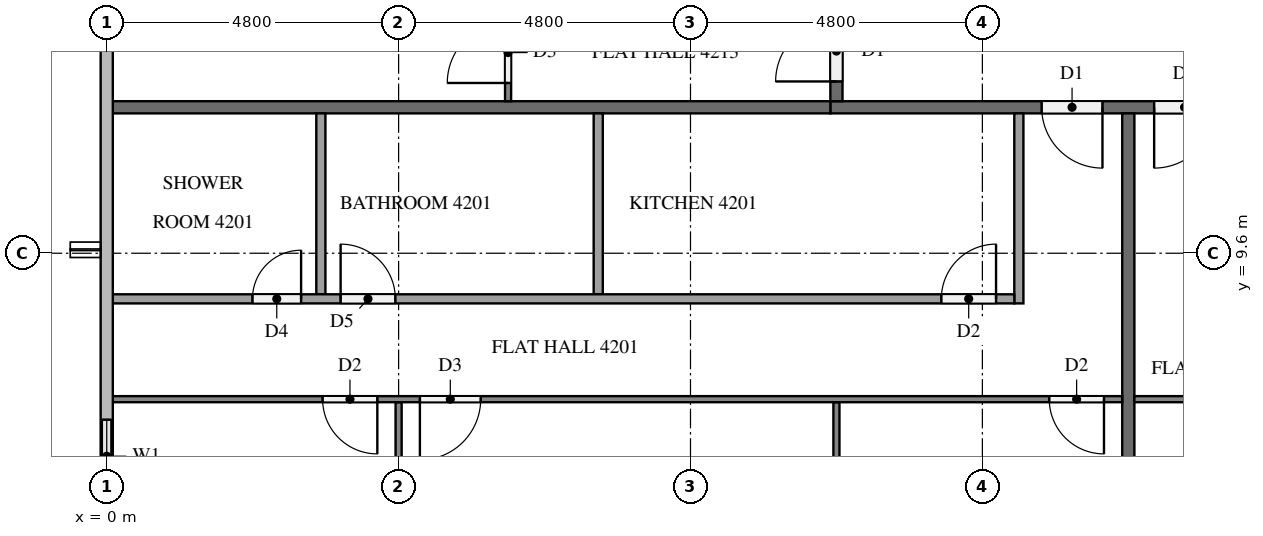
"""IFC4 building model, lengths in metres.
Left out: names, types, materials, properties, quantities, classifications, styles, units other than length and angle.
Written with IfcOpenShell. Run it as: python <this file> out.ifc"""

import sys

from ifc_helpers import new_model, si_unit, direction, frame, frame_2d, origin, place, context, subcontext, project, spatial, rectangle, extrude, element, fill, save


model = new_model("IFC4")
c1 = context("Model", 3, precision=1e-05, world=origin(), true_north=direction((0.0, 1.0)))
c2 = subcontext(c1, "Body", "Model", "MODEL_VIEW")
j1 = project(units=[si_unit("LENGTHUNIT", "METRE"), si_unit("PLANEANGLEUNIT", "RADIAN")], contexts=[c1])
p1 = place(None, origin())
s1 = spatial("IfcSite", under=j1, at=p1, CompositionType="ELEMENT")
p2 = place(p1, origin())
s2 = spatial("IfcBuilding", under=s1, at=p2, CompositionType="ELEMENT")
p3 = place(p2, frame((0.0, 0.0, 163.0)))
s3 = spatial("IfcBuildingStorey", under=s2, at=p3, CompositionType="ELEMENT", Elevation=163.0)
p4 = place(p3, frame((0.0, 7.2, 0.0), z_axis=(0.0, 0.0, 1.0), x_axis=(0.0, -1.0, 0.0)))
e1 = element("IfcWall", 1, at=p4, inside=s3, PredefinedType="SOLIDWALL", context=c2, shape_type="SweptSolid", body=[
    extrude(rectangle(XDim=1.875, YDim=0.15, at=frame_2d((0.938, 0.0))), origin(), (0.0, 0.0, 1.0), 3.2),
])
p5 = place(p4, frame((0.337, 0.0, 0.9)))
e2 = element("IfcOpeningElement", 2, at=p5, cuts=e1, PredefinedType="OPENING", context=c2, shape_type="SweptSolid", body=[
    extrude(rectangle(XDim=1.2, YDim=1.4, at=frame_2d((0.6, 0.7))), frame((0.0, 0.085, 0.0), z_axis=(0.0, -1.0, 0.0), x_axis=(1.0, 0.0, 0.0)), (0.0, 0.0, 1.0), 0.17),
])
p6 = place(p3, frame((50.5, 12.0, 0.0), z_axis=(0.0, 0.0, 1.0), x_axis=(-1.0, 0.0, 0.0)))
e3 = element("IfcWall", 3, at=p6, inside=s3, PredefinedType="PARTITIONING", context=c2, shape_type="SweptSolid", body=[
    extrude(rectangle(XDim=38.6, YDim=0.2, at=frame_2d((19.3, 0.0))), origin(), (0.0, 0.0, 1.0), 3.2),
])
p7 = place(p6, frame((34.125, 0.0, 0.0)))
e4 = element("IfcOpeningElement", 4, at=p7, cuts=e3, PredefinedType="OPENING", context=c2, shape_type="SweptSolid", body=[
    extrude(rectangle(XDim=1.0, YDim=2.1, at=frame_2d((0.5, 1.05))), frame((0.0, 0.11, 0.0), z_axis=(0.0, -1.0, 0.0), x_axis=(1.0, 0.0, 0.0)), (0.0, 0.0, 1.0), 0.22),
])
p8 = place(p6, frame((32.275, 0.0, 0.0)))
e5 = element("IfcOpeningElement", 5, at=p8, cuts=e3, PredefinedType="OPENING", context=c2, shape_type="SweptSolid", body=[
    extrude(rectangle(XDim=1.0, YDim=2.1, at=frame_2d((0.5, 1.05))), frame((0.0, 0.11, 0.0), z_axis=(0.0, -1.0, 0.0), x_axis=(1.0, 0.0, 0.0)), (0.0, 0.0, 1.0), 0.22),
])
p9 = place(p6, frame((12.525, 0.0, 0.0)))
e6 = element("IfcOpeningElement", 6, at=p9, cuts=e3, PredefinedType="OPENING", context=c2, shape_type="SweptSolid", body=[
    extrude(rectangle(XDim=1.0, YDim=2.1, at=frame_2d((0.5, 1.05))), frame((0.0, 0.11, 0.0), z_axis=(0.0, -1.0, 0.0), x_axis=(1.0, 0.0, 0.0)), (0.0, 0.0, 1.0), 0.22),
])
p10 = place(p6, frame((10.625, 0.0, 0.0)))
e7 = element("IfcOpeningElement", 7, at=p10, cuts=e3, PredefinedType="OPENING", context=c2, shape_type="SweptSolid", body=[
    extrude(rectangle(XDim=1.1, YDim=2.1, at=frame_2d((0.55, 1.05))), frame((0.0, 0.11, 0.0), z_axis=(0.0, -1.0, 0.0), x_axis=(1.0, 0.0, 0.0)), (0.0, 0.0, 1.0), 0.22),
])
p11 = place(p3, frame((12.0, 12.1, 0.0), z_axis=(0.0, 0.0, 1.0), x_axis=(0.0, 1.0, 0.0)))
e8 = element("IfcWall", 8, at=p11, inside=s3, PredefinedType="PARTITIONING", context=c2, shape_type="SweptSolid", body=[
    extrude(rectangle(XDim=28.6, YDim=0.2, at=frame_2d((14.3, 0.0))), origin(), (0.0, 0.0, 1.0), 3.2),
])
p12 = place(p11, frame((24.325, 0.0, 0.0)))
e9 = element("IfcOpeningElement", 9, at=p12, cuts=e8, PredefinedType="OPENING", context=c2, shape_type="SweptSolid", body=[
    extrude(rectangle(XDim=1.0, YDim=2.1, at=frame_2d((0.5, 1.05))), frame((0.0, 0.11, 0.0), z_axis=(0.0, -1.0, 0.0), x_axis=(1.0, 0.0, 0.0)), (0.0, 0.0, 1.0), 0.22),
])
p13 = place(p11, frame((22.475, 0.0, 0.0)))
e10 = element("IfcOpeningElement", 10, at=p13, cuts=e8, PredefinedType="OPENING", context=c2, shape_type="SweptSolid", body=[
    extrude(rectangle(XDim=1.0, YDim=2.1, at=frame_2d((0.5, 1.05))), frame((0.0, 0.11, 0.0), z_axis=(0.0, -1.0, 0.0), x_axis=(1.0, 0.0, 0.0)), (0.0, 0.0, 1.0), 0.22),
])
p14 = place(p11, frame((0.325, 0.0, 0.0)))
e11 = element("IfcOpeningElement", 11, at=p14, cuts=e8, PredefinedType="OPENING", context=c2, shape_type="SweptSolid", body=[
    extrude(rectangle(XDim=1.0, YDim=2.1, at=frame_2d((0.5, 1.05))), frame((0.0, 0.11, 0.0), z_axis=(0.0, -1.0, 0.0), x_axis=(1.0, 0.0, 0.0)), (0.0, 0.0, 1.0), 0.22),
])
for number, where, z_axis, x_axis in (
    (12, (16.8, 11.9, 0.0), (0.0, 0.0, 1.0), (0.0, -1.0, 0.0)),
    (13, (0.1, 12.0, 0.0), (0.0, 0.0, 1.0), (1.0, 0.0, 0.0)),
):
    element("IfcWall", number, at=place(p3, frame(where, z_axis=z_axis, x_axis=x_axis)), inside=s3, PredefinedType="PARTITIONING", context=c2, shape_type="SweptSolid", body=[
        extrude(rectangle(XDim=11.8, YDim=0.2, at=frame_2d((5.9, 0.0))), origin(), (0.0, 0.0, 1.0), 3.2),
    ])
p15 = place(p3, frame((12.0, 7.15, 0.0), z_axis=(0.0, 0.0, 1.0), x_axis=(0.0, -1.0, 0.0)))
e14 = element("IfcWall", 14, at=p15, inside=s3, PredefinedType="PARTITIONING", context=c2, shape_type="SweptSolid", body=[
    extrude(rectangle(XDim=7.05, YDim=0.1, at=frame_2d((3.525, 0.0))), origin(), (0.0, 0.0, 1.0), 3.2),
])
p16 = place(p3, frame((4.8, 7.15, 0.0), z_axis=(0.0, 0.0, 1.0), x_axis=(0.0, -1.0, 0.0)))
e15 = element("IfcWall", 15, at=p16, inside=s3, PredefinedType="PARTITIONING", context=c2, shape_type="SweptSolid", body=[
    extrude(rectangle(XDim=6.625, YDim=0.1, at=frame_2d((3.312, 0.0))), origin(), (0.0, 0.0, 1.0), 3.2),
])
p17 = place(p3, frame((16.7, 7.2, 0.0), z_axis=(0.0, 0.0, 1.0), x_axis=(-1.0, 0.0, 0.0)))
e16 = element("IfcWall", 16, at=p17, inside=s3, PredefinedType="PARTITIONING", context=c2, shape_type="SweptSolid", body=[
    extrude(rectangle(XDim=16.6, YDim=0.1, at=frame_2d((8.3, 0.0))), origin(), (0.0, 0.0, 1.0), 3.2),
])
p18 = place(p17, frame((0.3, 0.0, 0.0)))
e17 = element("IfcOpeningElement", 17, at=p18, cuts=e16, PredefinedType="OPENING", context=c2, shape_type="SweptSolid", body=[
    extrude(rectangle(XDim=0.9, YDim=2.1, at=frame_2d((0.45, 1.05))), frame((0.0, 0.06, 0.0), z_axis=(0.0, -1.0, 0.0), x_axis=(1.0, 0.0, 0.0)), (0.0, 0.0, 1.0), 0.12),
])
p19 = place(p17, frame((10.55, 0.0, 0.0)))
e18 = element("IfcOpeningElement", 18, at=p19, cuts=e16, PredefinedType="OPENING", context=c2, shape_type="SweptSolid", body=[
    extrude(rectangle(XDim=1.0, YDim=2.1, at=frame_2d((0.5, 1.05))), frame((0.0, 0.06, 0.0), z_axis=(0.0, -1.0, 0.0), x_axis=(1.0, 0.0, 0.0)), (0.0, 0.0, 1.0), 0.12),
])
p20 = place(p17, frame((12.25, 0.0, 0.0)))
e19 = element("IfcOpeningElement", 19, at=p20, cuts=e16, PredefinedType="OPENING", context=c2, shape_type="SweptSolid", body=[
    extrude(rectangle(XDim=0.9, YDim=2.1, at=frame_2d((0.45, 1.05))), frame((0.0, 0.06, 0.0), z_axis=(0.0, -1.0, 0.0), x_axis=(1.0, 0.0, 0.0)), (0.0, 0.0, 1.0), 0.12),
])
for number, where, z_axis, x_axis in (
    (20, (8.083, 11.9, 0.0), (0.0, 0.0, 1.0), (0.0, -1.0, 0.0)),
    (21, (3.521, 11.9, 0.0), (0.0, 0.0, 1.0), (0.0, -1.0, 0.0)),
):
    element("IfcWall", number, at=place(p3, frame(where, z_axis=z_axis, x_axis=x_axis)), inside=s3, PredefinedType="PARTITIONING", context=c2, shape_type="SweptSolid", body=[
        extrude(rectangle(XDim=2.975, YDim=0.15, at=frame_2d((1.487, 0.0))), origin(), (0.0, 0.0, 1.0), 3.2),
    ])
p21 = place(p3, frame((15.0, 11.9, 0.0), z_axis=(0.0, 0.0, 1.0), x_axis=(0.0, -1.0, 0.0)))
e22 = element("IfcWall", 22, at=p21, inside=s3, PredefinedType="PARTITIONING", context=c2, shape_type="SweptSolid", body=[
    extrude(rectangle(XDim=3.125, YDim=0.15, at=frame_2d((1.562, 0.0))), origin(), (0.0, 0.0, 1.0), 3.2),
])
p22 = place(p3, frame((0.1, 8.85, 0.0), z_axis=(0.0, 0.0, 1.0), x_axis=(1.0, 0.0, 0.0)))
e23 = element("IfcWall", 23, at=p22, inside=s3, PredefinedType="PARTITIONING", context=c2, shape_type="SweptSolid", body=[
    extrude(rectangle(XDim=14.825, YDim=0.15, at=frame_2d((7.413, 0.0))), origin(), (0.0, 0.0, 1.0), 3.2),
])
p23 = place(p22, frame((13.625, 0.0, 0.0)))
e24 = element("IfcOpeningElement", 24, at=p23, cuts=e23, PredefinedType="OPENING", context=c2, shape_type="SweptSolid", body=[
    extrude(rectangle(XDim=0.9, YDim=2.1, at=frame_2d((0.45, 1.05))), frame((0.0, 0.085, 0.0), z_axis=(0.0, -1.0, 0.0), x_axis=(1.0, 0.0, 0.0)), (0.0, 0.0, 1.0), 0.17),
])
p24 = place(p22, frame((3.746, 0.0, 0.0)))
e25 = element("IfcOpeningElement", 25, at=p24, cuts=e23, PredefinedType="OPENING", context=c2, shape_type="SweptSolid", body=[
    extrude(rectangle(XDim=0.9, YDim=2.1, at=frame_2d((0.45, 1.05))), frame((0.0, 0.085, 0.0), z_axis=(0.0, -1.0, 0.0), x_axis=(1.0, 0.0, 0.0)), (0.0, 0.0, 1.0), 0.17),
])
p25 = place(p22, frame((2.296, 0.0, 0.0)))
e26 = element("IfcOpeningElement", 26, at=p25, cuts=e23, PredefinedType="OPENING", context=c2, shape_type="SweptSolid", body=[
    extrude(rectangle(XDim=0.8, YDim=2.1, at=frame_2d((0.4, 1.05))), frame((0.0, 0.085, 0.0), z_axis=(0.0, -1.0, 0.0), x_axis=(1.0, 0.0, 0.0)), (0.0, 0.0, 1.0), 0.17),
])
p26 = place(p3, frame((23.9, 7.2, 0.0), z_axis=(0.0, 0.0, 1.0), x_axis=(-1.0, 0.0, 0.0)))
e27 = element("IfcWall", 27, at=p26, inside=s3, PredefinedType="PARTITIONING", context=c2, shape_type="SweptSolid", body=[
    extrude(rectangle(XDim=7.0, YDim=0.1, at=frame_2d((3.5, 0.0))), origin(), (0.0, 0.0, 1.0), 3.2),
])
p27 = place(p26, frame((0.3, 0.0, 0.0)))
e28 = element("IfcOpeningElement", 28, at=p27, cuts=e27, PredefinedType="OPENING", context=c2, shape_type="SweptSolid", body=[
    extrude(rectangle(XDim=1.0, YDim=2.1, at=frame_2d((0.5, 1.05))), frame((0.0, 0.06, 0.0), z_axis=(0.0, -1.0, 0.0), x_axis=(1.0, 0.0, 0.0)), (0.0, 0.0, 1.0), 0.12),
])
p28 = place(p3, frame((6.6, 12.1, 0.0), z_axis=(0.0, 0.0, 1.0), x_axis=(0.0, 1.0, 0.0)))
e29 = element("IfcWall", 29, at=p28, inside=s3, PredefinedType="PARTITIONING", context=c2, shape_type="SweptSolid", body=[
    extrude(rectangle(XDim=14.2, YDim=0.1, at=frame_2d((7.1, 0.0))), origin(), (0.0, 0.0, 1.0), 3.2),
])
p29 = place(p28, frame((0.3, 0.0, 0.0)))
e30 = element("IfcOpeningElement", 30, at=p29, cuts=e29, PredefinedType="OPENING", context=c2, shape_type="SweptSolid", body=[
    extrude(rectangle(XDim=1.0, YDim=2.1, at=frame_2d((0.5, 1.05))), frame((0.0, 0.06, 0.0), z_axis=(0.0, -1.0, 0.0), x_axis=(1.0, 0.0, 0.0)), (0.0, 0.0, 1.0), 0.12),
])
p30 = place(p28, frame((8.25, 0.0, 0.0)))
e31 = element("IfcOpeningElement", 31, at=p30, cuts=e29, PredefinedType="OPENING", context=c2, shape_type="SweptSolid", body=[
    extrude(rectangle(XDim=0.9, YDim=2.1, at=frame_2d((0.45, 1.05))), frame((0.0, 0.06, 0.0), z_axis=(0.0, -1.0, 0.0), x_axis=(1.0, 0.0, 0.0)), (0.0, 0.0, 1.0), 0.12),
])
p31 = place(p28, frame((9.85, 0.0, 0.0)))
e32 = element("IfcOpeningElement", 32, at=p31, cuts=e29, PredefinedType="OPENING", context=c2, shape_type="SweptSolid", body=[
    extrude(rectangle(XDim=0.9, YDim=2.1, at=frame_2d((0.45, 1.05))), frame((0.0, 0.06, 0.0), z_axis=(0.0, -1.0, 0.0), x_axis=(1.0, 0.0, 0.0)), (0.0, 0.0, 1.0), 0.12),
])
p32 = place(p5, origin())
e33 = element("IfcWindow", 33, at=p32, inside=s3, PartitioningType="SINGLE_PANEL", PredefinedType="WINDOW", context=c2, shape_type="SweptSolid", body=[
    extrude(rectangle(XDim=1.2, YDim=1.4, at=frame_2d((0.6, 0.7))), frame((0.0, 0.03, 0.0), z_axis=(0.0, -1.0, 0.0), x_axis=(1.0, 0.0, 0.0)), (0.0, 0.0, 1.0), 0.06),
])
fill(e2, e33)
p33 = place(p7, origin())
e34 = element("IfcDoor", 34, at=p33, inside=s3, OperationType="SINGLE_SWING_LEFT", PredefinedType="DOOR", context=c2, shape_type="SweptSolid", body=[
    extrude(rectangle(XDim=1.0, YDim=2.1, at=frame_2d((0.5, 1.05))), frame((0.0, 0.025, 0.0), z_axis=(0.0, -1.0, 0.0), x_axis=(1.0, 0.0, 0.0)), (0.0, 0.0, 1.0), 0.05),
])
fill(e4, e34)
p34 = place(p8, origin())
e35 = element("IfcDoor", 35, at=p34, inside=s3, OperationType="SINGLE_SWING_RIGHT", PredefinedType="DOOR", context=c2, shape_type="SweptSolid", body=[
    extrude(rectangle(XDim=1.0, YDim=2.1, at=frame_2d((0.5, 1.05))), frame((0.0, 0.025, 0.0), z_axis=(0.0, -1.0, 0.0), x_axis=(1.0, 0.0, 0.0)), (0.0, 0.0, 1.0), 0.05),
])
fill(e5, e35)
p35 = place(p14, origin())
e36 = element("IfcDoor", 36, at=p35, inside=s3, OperationType="SINGLE_SWING_LEFT", PredefinedType="DOOR", context=c2, shape_type="SweptSolid", body=[
    extrude(rectangle(XDim=1.0, YDim=2.1, at=frame_2d((0.5, 1.05))), frame((0.0, 0.025, 0.0), z_axis=(0.0, -1.0, 0.0), x_axis=(1.0, 0.0, 0.0)), (0.0, 0.0, 1.0), 0.05),
])
fill(e11, e36)
p36 = place(p18, origin())
e37 = element("IfcDoor", 37, at=p36, inside=s3, OperationType="SINGLE_SWING_LEFT", PredefinedType="DOOR", context=c2, shape_type="SweptSolid", body=[
    extrude(rectangle(XDim=0.9, YDim=2.1, at=frame_2d((0.45, 1.05))), frame((0.0, 0.025, 0.0), z_axis=(0.0, -1.0, 0.0), x_axis=(1.0, 0.0, 0.0)), (0.0, 0.0, 1.0), 0.05),
])
fill(e17, e37)
p37 = place(p19, origin())
e38 = element("IfcDoor", 38, at=p37, inside=s3, OperationType="SINGLE_SWING_RIGHT", PredefinedType="DOOR", context=c2, shape_type="SweptSolid", body=[
    extrude(rectangle(XDim=1.0, YDim=2.1, at=frame_2d((0.5, 1.05))), frame((0.0, 0.025, 0.0), z_axis=(0.0, -1.0, 0.0), x_axis=(1.0, 0.0, 0.0)), (0.0, 0.0, 1.0), 0.05),
])
fill(e18, e38)
p38 = place(p20, origin())
e39 = element("IfcDoor", 39, at=p38, inside=s3, OperationType="SINGLE_SWING_LEFT", PredefinedType="DOOR", context=c2, shape_type="SweptSolid", body=[
    extrude(rectangle(XDim=0.9, YDim=2.1, at=frame_2d((0.45, 1.05))), frame((0.0, 0.025, 0.0), z_axis=(0.0, -1.0, 0.0), x_axis=(1.0, 0.0, 0.0)), (0.0, 0.0, 1.0), 0.05),
])
fill(e19, e39)
p39 = place(p23, origin())
e40 = element("IfcDoor", 40, at=p39, inside=s3, OperationType="SINGLE_SWING_RIGHT", PredefinedType="DOOR", context=c2, shape_type="SweptSolid", body=[
    extrude(rectangle(XDim=0.9, YDim=2.1, at=frame_2d((0.45, 1.05))), frame((0.0, 0.025, 0.0), z_axis=(0.0, -1.0, 0.0), x_axis=(1.0, 0.0, 0.0)), (0.0, 0.0, 1.0), 0.05),
])
fill(e24, e40)
p40 = place(p24, origin())
e41 = element("IfcDoor", 41, at=p40, inside=s3, OperationType="SINGLE_SWING_LEFT", PredefinedType="DOOR", context=c2, shape_type="SweptSolid", body=[
    extrude(rectangle(XDim=0.9, YDim=2.1, at=frame_2d((0.45, 1.05))), frame((0.0, 0.025, 0.0), z_axis=(0.0, -1.0, 0.0), x_axis=(1.0, 0.0, 0.0)), (0.0, 0.0, 1.0), 0.05),
])
fill(e25, e41)
p41 = place(p25, origin())
e42 = element("IfcDoor", 42, at=p41, inside=s3, OperationType="SINGLE_SWING_RIGHT", PredefinedType="DOOR", context=c2, shape_type="SweptSolid", body=[
    extrude(rectangle(XDim=0.8, YDim=2.1, at=frame_2d((0.4, 1.05))), frame((0.0, 0.025, 0.0), z_axis=(0.0, -1.0, 0.0), x_axis=(1.0, 0.0, 0.0)), (0.0, 0.0, 1.0), 0.05),
])
fill(e26, e42)
p42 = place(p29, origin())
e43 = element("IfcDoor", 43, at=p42, inside=s3, OperationType="SINGLE_SWING_LEFT", PredefinedType="DOOR", context=c2, shape_type="SweptSolid", body=[
    extrude(rectangle(XDim=1.0, YDim=2.1, at=frame_2d((0.5, 1.05))), frame((0.0, 0.025, 0.0), z_axis=(0.0, -1.0, 0.0), x_axis=(1.0, 0.0, 0.0)), (0.0, 0.0, 1.0), 0.05),
])
fill(e30, e43)
save(model, sys.argv[1])
